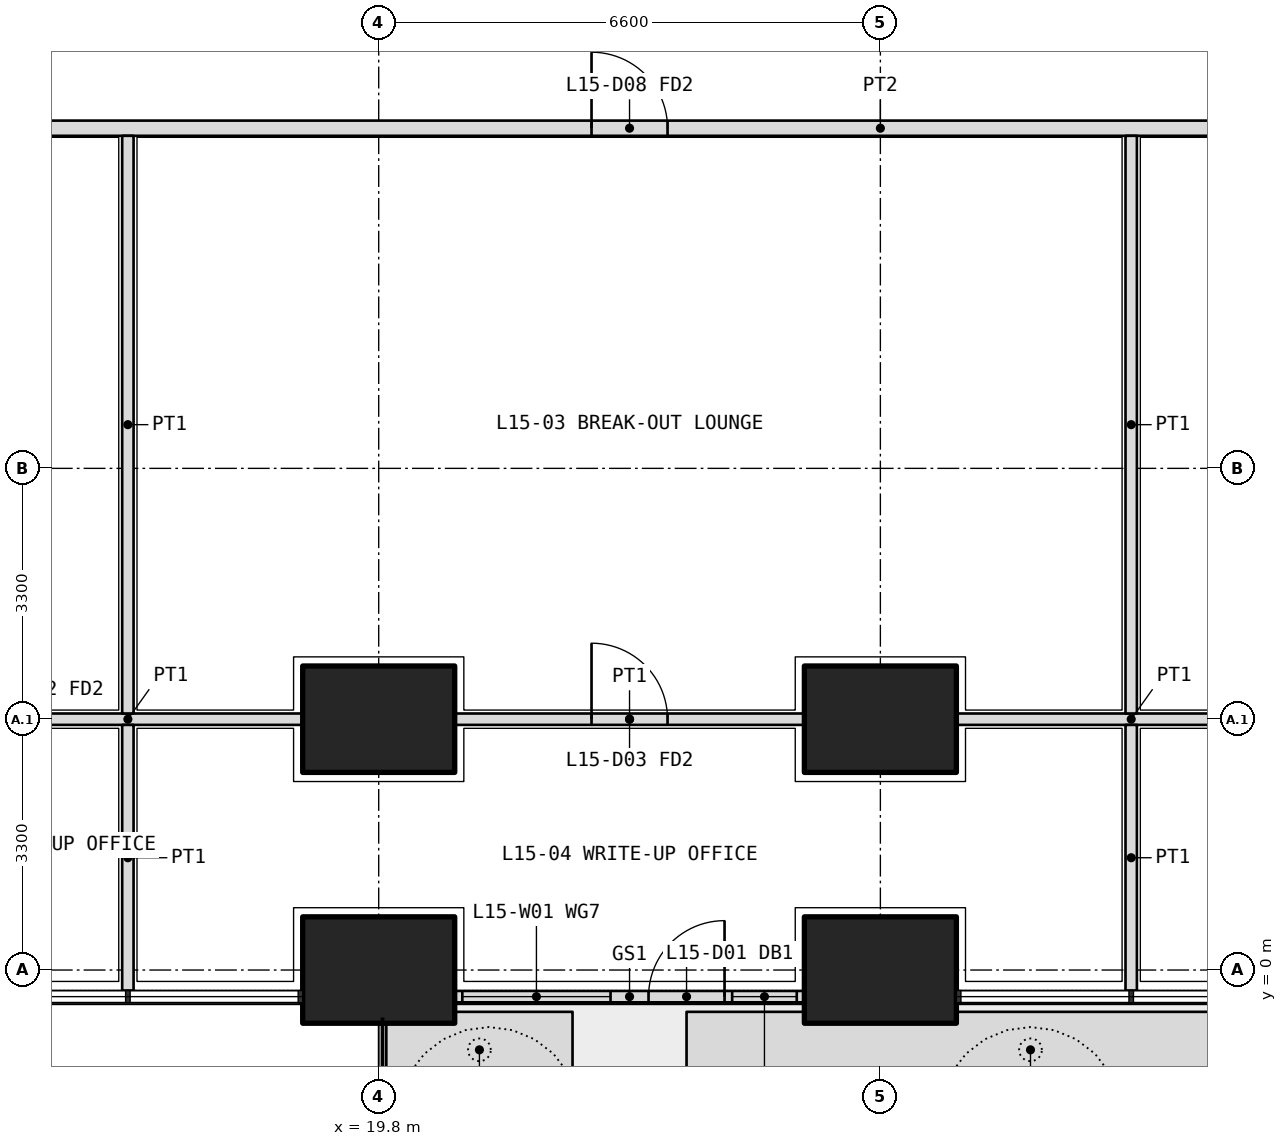
"""IFC4 building model, lengths in metres.
Left out: names, types, materials, properties, quantities, classifications, styles, units other than length and angle.
Written with IfcOpenShell. Run it as: python <this file> out.ifc"""

import sys

from ifc_helpers import new_model, si_unit, direction, frame, frame_2d, origin, origin_2d, place, context, subcontext, project, spatial, polyline, rectangle, outline, extrude, element, fill, save


model = new_model("IFC4")
c1 = context("Model", 3, precision=1e-05, world=origin(), true_north=direction((0.0, 1.0)))
c2 = subcontext(c1, "Body", "Model", "MODEL_VIEW")
j1 = project(units=[si_unit("LENGTHUNIT", "METRE"), si_unit("PLANEANGLEUNIT", "RADIAN")], contexts=[c1])
p1 = place(None, origin())
s1 = spatial("IfcSite", under=j1, at=p1, CompositionType="ELEMENT")
p2 = place(p1, origin())
s2 = spatial("IfcBuilding", under=s1, at=p2, CompositionType="ELEMENT")
p3 = place(p2, frame((0.0, 0.0, 67.5)))
s3 = spatial("IfcBuildingStorey", under=s2, at=p3, CompositionType="ELEMENT", Elevation=67.5)
for number, where, z_axis, x_axis in (
    (1, (19.8, 0.0, 0.0), (0.0, 0.0, 1.0), (1.0, 0.0, 0.0)),
    (2, (26.4, 0.0, 0.0), (0.0, 0.0, 1.0), (1.0, 0.0, 0.0)),
    (3, (19.8, 3.3, 0.0), (0.0, 0.0, 1.0), (1.0, 0.0, 0.0)),
    (4, (26.4, 3.3, 0.0), (0.0, 0.0, 1.0), (1.0, 0.0, 0.0)),
):
    element("IfcColumn", number, at=place(p3, frame(where, z_axis=z_axis, x_axis=x_axis)), inside=s3, PredefinedType="COLUMN", context=c2, shape_type="SweptSolid", body=[
        extrude(rectangle(XDim=2.0, YDim=1.4, at=origin_2d()), origin(), (0.0, 0.0, 1.0), 4.2),
    ])
p4 = place(p3, origin())
e5 = element("IfcWall", 5, at=p4, inside=s3, PredefinedType="USERDEFINED", context=c2, shape_type="SweptSolid", body=[
    extrude(outline(polyline([(19.9, -1.55), (22.35, -1.55), (22.35, -0.55), (19.9, -0.55), (19.9, -1.55)]), holes=[polyline([(20.05, -1.4), (22.2, -1.4), (22.2, -0.7), (20.05, -0.7), (20.05, -1.4)])]), origin(), (0.0, 0.0, 1.0), 1.05),
])
p5 = place(p3, origin())
e6 = element("IfcWall", 6, at=p5, inside=s3, PredefinedType="USERDEFINED", context=c2, shape_type="SweptSolid", body=[
    extrude(outline(polyline([(23.85, -1.55), (32.9, -1.55), (32.9, -0.55), (23.85, -0.55), (23.85, -1.55)]), holes=[polyline([(24.0, -1.4), (32.75, -1.4), (32.75, -0.7), (24.0, -0.7), (24.0, -1.4)])]), origin(), (0.0, 0.0, 1.0), 1.05),
])
p6 = place(p3, frame((20.8, -0.35, 0.0), z_axis=(0.0, 0.0, 1.0), x_axis=(1.0, 0.0, 0.0)))
e7 = element("IfcWall", 7, at=p6, inside=s3, PredefinedType="SOLIDWALL", context=c2, shape_type="SweptSolid", body=[
    extrude(rectangle(XDim=4.6, YDim=0.15, at=frame_2d((2.3, 0.0))), origin(), (0.0, 0.0, 1.0), 2.6),
])
p7 = place(p6, frame((2.55, 0.0, 0.0)))
e8 = element("IfcOpeningElement", 8, at=p7, cuts=e7, PredefinedType="OPENING", context=c2, shape_type="SweptSolid", body=[
    extrude(rectangle(XDim=1.0, YDim=2.4, at=frame_2d((0.5, 1.2))), frame((0.0, 0.085, 0.0), z_axis=(0.0, -1.0, 0.0), x_axis=(1.0, 0.0, 0.0)), (0.0, 0.0, 1.0), 0.17),
])
p8 = place(p6, frame((0.1, 0.0, 0.1)))
e9 = element("IfcOpeningElement", 9, at=p8, cuts=e7, PredefinedType="OPENING", context=c2, shape_type="SweptSolid", body=[
    extrude(rectangle(XDim=1.95, YDim=2.2, at=frame_2d((0.975, 1.1))), frame((0.0, 0.085, 0.0), z_axis=(0.0, -1.0, 0.0), x_axis=(1.0, 0.0, 0.0)), (0.0, 0.0, 1.0), 0.17),
])
p9 = place(p6, frame((3.65, 0.0, 0.1)))
e10 = element("IfcOpeningElement", 10, at=p9, cuts=e7, PredefinedType="OPENING", context=c2, shape_type="SweptSolid", body=[
    extrude(rectangle(XDim=0.85, YDim=2.2, at=frame_2d((0.425, 1.1))), frame((0.0, 0.085, 0.0), z_axis=(0.0, -1.0, 0.0), x_axis=(1.0, 0.0, 0.0)), (0.0, 0.0, 1.0), 0.17),
])
p10 = place(p3, frame((10.975, 11.075, 0.0), z_axis=(0.0, 0.0, 1.0), x_axis=(1.0, 0.0, 0.0)))
e11 = element("IfcWall", 11, at=p10, inside=s3, PredefinedType="PARTITIONING", context=c2, shape_type="SweptSolid", body=[
    extrude(rectangle(XDim=30.85, YDim=0.2, at=frame_2d((15.425, 0.0))), origin(), (0.0, 0.0, 1.0), 2.85),
])
p11 = place(p10, frame((2.312, 0.0, 0.0)))
e12 = element("IfcOpeningElement", 12, at=p11, cuts=e11, PredefinedType="OPENING", context=c2, shape_type="SweptSolid", body=[
    extrude(rectangle(XDim=1.0, YDim=2.1, at=frame_2d((0.5, 1.05))), frame((0.0, 0.11, 0.0), z_axis=(0.0, -1.0, 0.0), x_axis=(1.0, 0.0, 0.0)), (0.0, 0.0, 1.0), 0.22),
])
p12 = place(p10, frame((11.625, 0.0, 0.0)))
e13 = element("IfcOpeningElement", 13, at=p12, cuts=e11, PredefinedType="OPENING", context=c2, shape_type="SweptSolid", body=[
    extrude(rectangle(XDim=1.0, YDim=2.1, at=frame_2d((0.5, 1.05))), frame((0.0, 0.11, 0.0), z_axis=(0.0, -1.0, 0.0), x_axis=(1.0, 0.0, 0.0)), (0.0, 0.0, 1.0), 0.22),
])
p13 = place(p10, frame((23.075, 0.0, 0.0)))
e14 = element("IfcOpeningElement", 14, at=p13, cuts=e11, PredefinedType="OPENING", context=c2, shape_type="SweptSolid", body=[
    extrude(rectangle(XDim=1.2, YDim=2.1, at=frame_2d((0.6, 1.05))), frame((0.0, 0.11, 0.0), z_axis=(0.0, -1.0, 0.0), x_axis=(1.0, 0.0, 0.0)), (0.0, 0.0, 1.0), 0.22),
])
p14 = place(p10, frame((29.188, 0.0, 0.0)))
e15 = element("IfcOpeningElement", 15, at=p14, cuts=e11, PredefinedType="OPENING", context=c2, shape_type="SweptSolid", body=[
    extrude(rectangle(XDim=1.0, YDim=2.1, at=frame_2d((0.5, 1.05))), frame((0.0, 0.11, 0.0), z_axis=(0.0, -1.0, 0.0), x_axis=(1.0, 0.0, 0.0)), (0.0, 0.0, 1.0), 0.22),
])
p15 = place(p3, frame((14.2, 3.3, 0.0), z_axis=(0.0, 0.0, 1.0), x_axis=(1.0, 0.0, 0.0)))
e16 = element("IfcWall", 16, at=p15, inside=s3, PredefinedType="PARTITIONING", context=c2, shape_type="SweptSolid", body=[
    extrude(rectangle(XDim=4.6, YDim=0.15, at=frame_2d((2.3, 0.0))), origin(), (0.0, 0.0, 1.0), 3.9),
])
p16 = place(p15, frame((0.25, 0.0, 0.0)))
e17 = element("IfcOpeningElement", 17, at=p16, cuts=e16, PredefinedType="OPENING", context=c2, shape_type="SweptSolid", body=[
    extrude(rectangle(XDim=1.0, YDim=2.1, at=frame_2d((0.5, 1.05))), frame((0.0, 0.085, 0.0), z_axis=(0.0, -1.0, 0.0), x_axis=(1.0, 0.0, 0.0)), (0.0, 0.0, 1.0), 0.17),
])
p17 = place(p3, frame((20.8, 3.3, 0.0), z_axis=(0.0, 0.0, 1.0), x_axis=(1.0, 0.0, 0.0)))
e18 = element("IfcWall", 18, at=p17, inside=s3, PredefinedType="PARTITIONING", context=c2, shape_type="SweptSolid", body=[
    extrude(rectangle(XDim=4.6, YDim=0.15, at=frame_2d((2.3, 0.0))), origin(), (0.0, 0.0, 1.0), 3.9),
])
p18 = place(p17, frame((1.8, 0.0, 0.0)))
e19 = element("IfcOpeningElement", 19, at=p18, cuts=e18, PredefinedType="OPENING", context=c2, shape_type="SweptSolid", body=[
    extrude(rectangle(XDim=1.0, YDim=2.1, at=frame_2d((0.5, 1.05))), frame((0.0, 0.085, 0.0), z_axis=(0.0, -1.0, 0.0), x_axis=(1.0, 0.0, 0.0)), (0.0, 0.0, 1.0), 0.17),
])
p19 = place(p3, frame((27.4, 3.3, 0.0), z_axis=(0.0, 0.0, 1.0), x_axis=(1.0, 0.0, 0.0)))
e20 = element("IfcWall", 20, at=p19, inside=s3, PredefinedType="PARTITIONING", context=c2, shape_type="SweptSolid", body=[
    extrude(rectangle(XDim=4.6, YDim=0.15, at=frame_2d((2.3, 0.0))), origin(), (0.0, 0.0, 1.0), 3.9),
])
p20 = place(p3, frame((16.5, -0.27, 0.0), z_axis=(0.0, 0.0, 1.0), x_axis=(0.0, 1.0, 0.0)))
e21 = element("IfcWall", 21, at=p20, inside=s3, PredefinedType="PARTITIONING", context=c2, shape_type="SweptSolid", body=[
    extrude(rectangle(XDim=3.495, YDim=0.15, at=frame_2d((1.748, 0.0))), origin(), (0.0, 0.0, 1.0), 2.6),
])
p21 = place(p3, frame((16.5, 3.375, 0.0), z_axis=(0.0, 0.0, 1.0), x_axis=(0.0, 1.0, 0.0)))
e22 = element("IfcWall", 22, at=p21, inside=s3, PredefinedType="PARTITIONING", context=c2, shape_type="SweptSolid", body=[
    extrude(rectangle(XDim=7.6, YDim=0.15, at=frame_2d((3.8, 0.0))), origin(), (0.0, 0.0, 1.0), 3.9),
])
p22 = place(p3, frame((29.7, -0.27, 0.0), z_axis=(0.0, 0.0, 1.0), x_axis=(0.0, 1.0, 0.0)))
e23 = element("IfcWall", 23, at=p22, inside=s3, PredefinedType="PARTITIONING", context=c2, shape_type="SweptSolid", body=[
    extrude(rectangle(XDim=3.495, YDim=0.15, at=frame_2d((1.748, 0.0))), origin(), (0.0, 0.0, 1.0), 2.6),
])
p23 = place(p3, frame((29.7, 3.375, 0.0), z_axis=(0.0, 0.0, 1.0), x_axis=(0.0, 1.0, 0.0)))
e24 = element("IfcWall", 24, at=p23, inside=s3, PredefinedType="PARTITIONING", context=c2, shape_type="SweptSolid", body=[
    extrude(rectangle(XDim=7.6, YDim=0.15, at=frame_2d((3.8, 0.0))), origin(), (0.0, 0.0, 1.0), 3.9),
])
p24 = place(p7, origin())
e25 = element("IfcDoor", 25, at=p24, inside=s3, OperationType="SINGLE_SWING_RIGHT", PredefinedType="DOOR", context=c2, shape_type="SweptSolid", body=[
    extrude(rectangle(XDim=1.0, YDim=2.4, at=frame_2d((0.5, 1.2))), frame((0.0, 0.025, 0.0), z_axis=(0.0, -1.0, 0.0), x_axis=(1.0, 0.0, 0.0)), (0.0, 0.0, 1.0), 0.05),
])
fill(e8, e25)
p25 = place(p8, origin())
e26 = element("IfcWindow", 26, at=p25, inside=s3, PartitioningType="SINGLE_PANEL", PredefinedType="WINDOW", context=c2, shape_type="SweptSolid", body=[
    extrude(rectangle(XDim=1.95, YDim=2.2, at=frame_2d((0.975, 1.1))), frame((0.0, 0.03, 0.0), z_axis=(0.0, -1.0, 0.0), x_axis=(1.0, 0.0, 0.0)), (0.0, 0.0, 1.0), 0.06),
])
fill(e9, e26)
p26 = place(p9, origin())
e27 = element("IfcWindow", 27, at=p26, inside=s3, PartitioningType="SINGLE_PANEL", PredefinedType="WINDOW", context=c2, shape_type="SweptSolid", body=[
    extrude(rectangle(XDim=0.85, YDim=2.2, at=frame_2d((0.425, 1.1))), frame((0.0, 0.03, 0.0), z_axis=(0.0, -1.0, 0.0), x_axis=(1.0, 0.0, 0.0)), (0.0, 0.0, 1.0), 0.06),
])
fill(e10, e27)
p27 = place(p12, origin())
e28 = element("IfcDoor", 28, at=p27, inside=s3, OperationType="SINGLE_SWING_LEFT", PredefinedType="DOOR", context=c2, shape_type="SweptSolid", body=[
    extrude(rectangle(XDim=1.0, YDim=2.1, at=frame_2d((0.5, 1.05))), frame((0.0, 0.025, 0.0), z_axis=(0.0, -1.0, 0.0), x_axis=(1.0, 0.0, 0.0)), (0.0, 0.0, 1.0), 0.05),
])
fill(e13, e28)
p28 = place(p18, origin())
e29 = element("IfcDoor", 29, at=p28, inside=s3, OperationType="SINGLE_SWING_LEFT", PredefinedType="DOOR", context=c2, shape_type="SweptSolid", body=[
    extrude(rectangle(XDim=1.0, YDim=2.1, at=frame_2d((0.5, 1.05))), frame((0.0, 0.025, 0.0), z_axis=(0.0, -1.0, 0.0), x_axis=(1.0, 0.0, 0.0)), (0.0, 0.0, 1.0), 0.05),
])
fill(e19, e29)
save(model, sys.argv[1])
